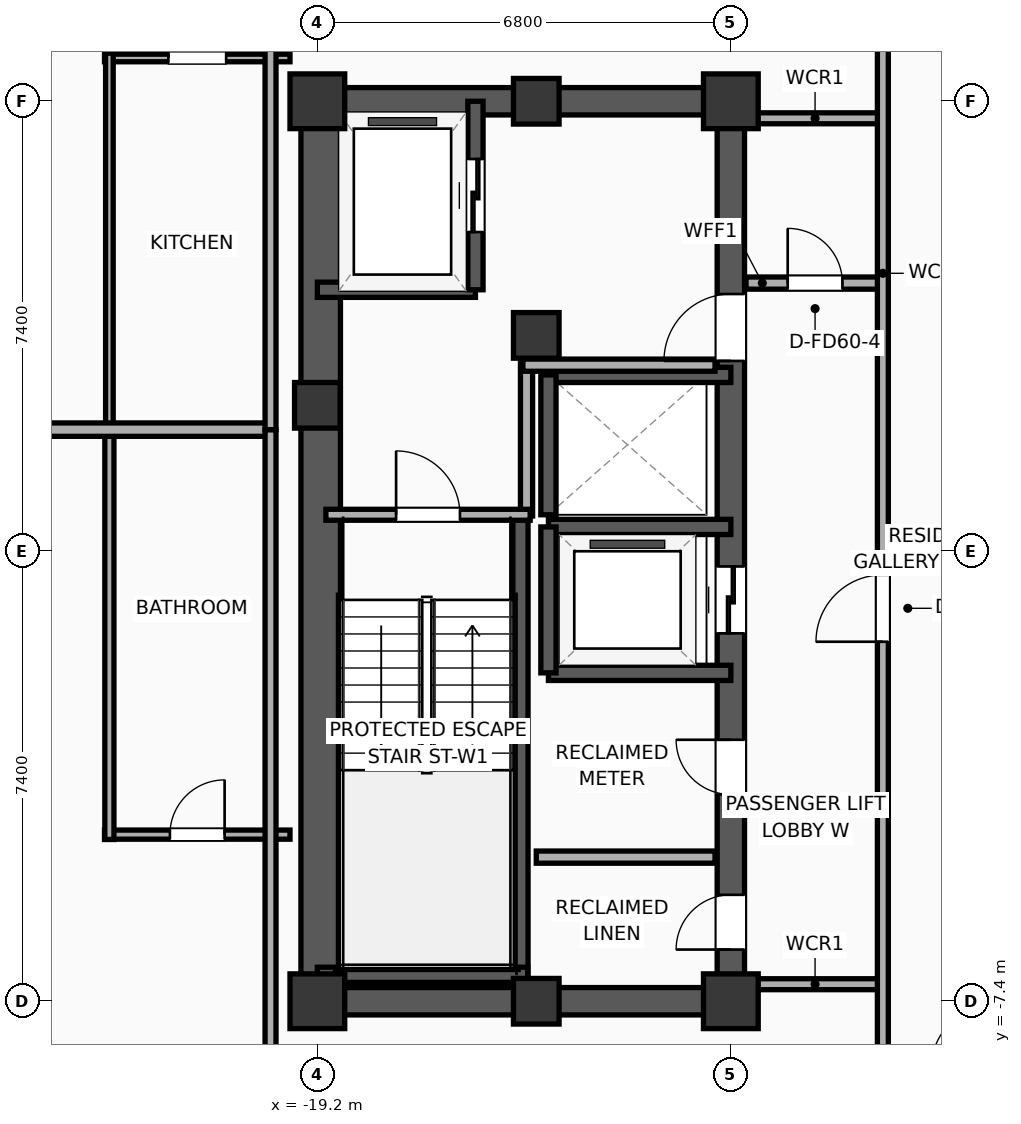
"""IFC4 building model, lengths in metres.
Left out: names, types, materials, properties, quantities, classifications, styles, units other than length and angle.
Written with IfcOpenShell. Run it as: python <this file> out.ifc"""

import sys

from ifc_helpers import new_model, si_unit, direction, frame, frame_2d, origin, origin_2d, place, context, subcontext, project, spatial, rectangle, extrude, element, fill, save


model = new_model("IFC4")
c1 = context("Model", 3, precision=1e-05, world=origin(), true_north=direction((0.0, 1.0)))
c2 = subcontext(c1, "Body", "Model", "MODEL_VIEW")
j1 = project(units=[si_unit("LENGTHUNIT", "METRE"), si_unit("PLANEANGLEUNIT", "RADIAN")], contexts=[c1])
p1 = place(None, origin())
s1 = spatial("IfcSite", under=j1, at=p1, CompositionType="ELEMENT")
p2 = place(p1, origin())
s2 = spatial("IfcBuilding", under=s1, at=p2, CompositionType="ELEMENT")
p3 = place(p2, frame((0.0, 0.0, 175.5)))
s3 = spatial("IfcBuildingStorey", under=s2, at=p3, CompositionType="ELEMENT", Elevation=175.5)
p4 = place(p3, frame((-19.2, -7.4, 0.0), z_axis=(0.0, 0.0, 1.0), x_axis=(1.0, 0.0, 0.0)))
e1 = element("IfcColumn", 1, at=p4, inside=s3, PredefinedType="COLUMN", context=c2, shape_type="SweptSolid", body=[
    extrude(rectangle(XDim=0.9, YDim=0.9, at=origin_2d()), origin(), (0.0, 0.0, 1.0), 3.9),
])
p5 = place(p3, frame((-19.2, 2.4, 0.0), z_axis=(0.0, 0.0, 1.0), x_axis=(1.0, 0.0, 0.0)))
e2 = element("IfcColumn", 2, at=p5, inside=s3, PredefinedType="COLUMN", context=c2, shape_type="SweptSolid", body=[
    extrude(rectangle(XDim=0.75, YDim=0.75, at=origin_2d()), origin(), (0.0, 0.0, 1.0), 3.9),
])
p6 = place(p3, frame((-19.2, 7.4, 0.0), z_axis=(0.0, 0.0, 1.0), x_axis=(1.0, 0.0, 0.0)))
e3 = element("IfcColumn", 3, at=p6, inside=s3, PredefinedType="COLUMN", context=c2, shape_type="SweptSolid", body=[
    extrude(rectangle(XDim=0.9, YDim=0.9, at=origin_2d()), origin(), (0.0, 0.0, 1.0), 3.9),
])
for number, where, z_axis, x_axis in (
    (4, (-15.6, -7.4, 0.0), (0.0, 0.0, 1.0), (1.0, 0.0, 0.0)),
    (5, (-15.6, 7.4, 0.0), (0.0, 0.0, 1.0), (1.0, 0.0, 0.0)),
):
    element("IfcColumn", number, at=place(p3, frame(where, z_axis=z_axis, x_axis=x_axis)), inside=s3, PredefinedType="COLUMN", context=c2, shape_type="SweptSolid", body=[
        extrude(rectangle(XDim=0.75, YDim=0.75, at=origin_2d()), origin(), (0.0, 0.0, 1.0), 3.9),
    ])
p7 = place(p3, frame((-12.4, -7.4, 0.0), z_axis=(0.0, 0.0, 1.0), x_axis=(1.0, 0.0, 0.0)))
e6 = element("IfcColumn", 6, at=p7, inside=s3, PredefinedType="COLUMN", context=c2, shape_type="SweptSolid", body=[
    extrude(rectangle(XDim=0.9, YDim=0.9, at=origin_2d()), origin(), (0.0, 0.0, 1.0), 3.9),
])
p8 = place(p3, frame((-15.6, 3.55, 0.0), z_axis=(0.0, 0.0, 1.0), x_axis=(1.0, 0.0, 0.0)))
e7 = element("IfcColumn", 7, at=p8, inside=s3, PredefinedType="COLUMN", context=c2, shape_type="SweptSolid", body=[
    extrude(rectangle(XDim=0.75, YDim=0.75, at=origin_2d()), origin(), (0.0, 0.0, 1.0), 3.9),
])
p9 = place(p3, frame((-12.4, 7.4, 0.0), z_axis=(0.0, 0.0, 1.0), x_axis=(1.0, 0.0, 0.0)))
e8 = element("IfcColumn", 8, at=p9, inside=s3, PredefinedType="COLUMN", context=c2, shape_type="SweptSolid", body=[
    extrude(rectangle(XDim=0.9, YDim=0.9, at=origin_2d()), origin(), (0.0, 0.0, 1.0), 3.9),
])
for number, where, z_axis, x_axis in (
    (9, (-19.425, -7.4, 0.0), (0.0, 0.0, 1.0), (1.0, 0.0, 0.0)),
    (10, (-19.425, 7.4, 0.0), (0.0, 0.0, 1.0), (1.0, 0.0, 0.0)),
):
    element("IfcWall", number, at=place(p3, frame(where, z_axis=z_axis, x_axis=x_axis)), inside=s3, PredefinedType="SHEAR", context=c2, shape_type="SweptSolid", body=[
        extrude(rectangle(XDim=7.25, YDim=0.45, at=frame_2d((3.625, 0.0))), origin(), (0.0, 0.0, 1.0), 3.65),
    ])
p10 = place(p3, frame((-19.145, -7.4, 0.0), z_axis=(0.0, 0.0, 1.0), x_axis=(0.0, 1.0, 0.0)))
e11 = element("IfcWall", 11, at=p10, inside=s3, PredefinedType="SHEAR", context=c2, shape_type="SweptSolid", body=[
    extrude(rectangle(XDim=14.8, YDim=0.65, at=frame_2d((7.4, 0.0))), origin(), (0.0, 0.0, 1.0), 3.65),
])
p11 = place(p3, frame((-12.4, -7.4, 0.0), z_axis=(0.0, 0.0, 1.0), x_axis=(0.0, 1.0, 0.0)))
e12 = element("IfcWall", 12, at=p11, inside=s3, PredefinedType="SHEAR", context=c2, shape_type="SweptSolid", body=[
    extrude(rectangle(XDim=14.8, YDim=0.45, at=frame_2d((7.4, 0.0))), origin(), (0.0, 0.0, 1.0), 3.65),
])
p12 = place(p11, frame((6.05, 0.0, 0.0)))
e13 = element("IfcOpeningElement", 13, at=p12, cuts=e12, PredefinedType="OPENING", context=c2, shape_type="SweptSolid", body=[
    extrude(rectangle(XDim=1.1, YDim=2.05, at=frame_2d((0.55, 1.025))), frame((0.0, 0.235, 0.0), z_axis=(0.0, -1.0, 0.0), x_axis=(1.0, 0.0, 0.0)), (0.0, 0.0, 1.0), 0.47),
])
p13 = place(p11, frame((10.53, 0.0, 0.0)))
e14 = element("IfcOpeningElement", 14, at=p13, cuts=e12, PredefinedType="OPENING", context=c2, shape_type="SweptSolid", body=[
    extrude(rectangle(XDim=1.1, YDim=2.05, at=frame_2d((0.55, 1.025))), frame((0.0, 0.235, 0.0), z_axis=(0.0, -1.0, 0.0), x_axis=(1.0, 0.0, 0.0)), (0.0, 0.0, 1.0), 0.47),
])
p14 = place(p11, frame((0.85, 0.0, 0.0)))
e15 = element("IfcOpeningElement", 15, at=p14, cuts=e12, PredefinedType="OPENING", context=c2, shape_type="SweptSolid", body=[
    extrude(rectangle(XDim=0.9, YDim=2.05, at=frame_2d((0.45, 1.025))), frame((0.0, 0.235, 0.0), z_axis=(0.0, -1.0, 0.0), x_axis=(1.0, 0.0, 0.0)), (0.0, 0.0, 1.0), 0.47),
])
p15 = place(p11, frame((3.4, 0.0, 0.0)))
e16 = element("IfcOpeningElement", 16, at=p15, cuts=e12, PredefinedType="OPENING", context=c2, shape_type="SweptSolid", body=[
    extrude(rectangle(XDim=0.9, YDim=2.05, at=frame_2d((0.45, 1.025))), frame((0.0, 0.235, 0.0), z_axis=(0.0, -1.0, 0.0), x_axis=(1.0, 0.0, 0.0)), (0.0, 0.0, 1.0), 0.47),
])
p16 = place(p3, frame((-15.86, -7.085, 0.0), z_axis=(0.0, 0.0, 1.0), x_axis=(0.0, 1.0, 0.0)))
e17 = element("IfcWall", 17, at=p16, inside=s3, PredefinedType="SOLIDWALL", context=c2, shape_type="SweptSolid", body=[
    extrude(rectangle(XDim=7.685, YDim=0.25, at=frame_2d((3.843, 0.0))), origin(), (0.0, 0.0, 1.0), 3.65),
])
p17 = place(p3, frame((-19.2, -6.965, 0.0), z_axis=(0.0, 0.0, 1.0), x_axis=(1.0, 0.0, 0.0)))
e18 = element("IfcWall", 18, at=p17, inside=s3, PredefinedType="SOLIDWALL", context=c2, shape_type="SweptSolid", body=[
    extrude(rectangle(XDim=3.46, YDim=0.25, at=frame_2d((1.73, 0.0))), origin(), (0.0, 0.0, 1.0), 3.65),
])
p18 = place(p3, frame((-19.2, 4.3, 0.0), z_axis=(0.0, 0.0, 1.0), x_axis=(1.0, 0.0, 0.0)))
e19 = element("IfcWall", 19, at=p18, inside=s3, PredefinedType="SOLIDWALL", context=c2, shape_type="SweptSolid", body=[
    extrude(rectangle(XDim=2.6, YDim=0.25, at=frame_2d((1.3, 0.0))), origin(), (0.0, 0.0, 1.0), 3.65),
])
p19 = place(p3, frame((-16.6, 4.3, 0.0), z_axis=(0.0, 0.0, 1.0), x_axis=(0.0, 1.0, 0.0)))
e20 = element("IfcWall", 20, at=p19, inside=s3, PredefinedType="SOLIDWALL", context=c2, shape_type="SweptSolid", body=[
    extrude(rectangle(XDim=3.1, YDim=0.25, at=frame_2d((1.55, 0.0))), origin(), (0.0, 0.0, 1.0), 3.65),
])
p20 = place(p19, frame((0.95, 0.0, 0.0)))
e21 = element("IfcOpeningElement", 21, at=p20, cuts=e20, PredefinedType="OPENING", context=c2, shape_type="SweptSolid", body=[
    extrude(rectangle(XDim=1.2, YDim=2.05, at=frame_2d((0.6, 1.025))), frame((0.0, 0.135, 0.0), z_axis=(0.0, -1.0, 0.0), x_axis=(1.0, 0.0, 0.0)), (0.0, 0.0, 1.0), 0.27),
])
for number, where, z_axis, x_axis in (
    (22, (-15.4, -2.0, 0.0), (0.0, 0.0, 1.0), (1.0, 0.0, 0.0)),
    (23, (-12.4, 0.4, 0.0), (0.0, 0.0, 1.0), (-1.0, 0.0, 0.0)),
):
    element("IfcWall", number, at=place(p3, frame(where, z_axis=z_axis, x_axis=x_axis)), inside=s3, PredefinedType="SOLIDWALL", context=c2, shape_type="SweptSolid", body=[
        extrude(rectangle(XDim=3.0, YDim=0.25, at=frame_2d((1.5, 0.0))), origin(), (0.0, 0.0, 1.0), 3.65),
    ])
p21 = place(p3, frame((-15.4, 0.4, 0.0), z_axis=(0.0, 0.0, 1.0), x_axis=(0.0, -1.0, 0.0)))
e24 = element("IfcWall", 24, at=p21, inside=s3, PredefinedType="SOLIDWALL", context=c2, shape_type="SweptSolid", body=[
    extrude(rectangle(XDim=2.4, YDim=0.25, at=frame_2d((1.2, 0.0))), origin(), (0.0, 0.0, 1.0), 3.65),
])
p22 = place(p3, frame((-12.4, 2.9, 0.0), z_axis=(0.0, 0.0, 1.0), x_axis=(-1.0, 0.0, 0.0)))
e25 = element("IfcWall", 25, at=p22, inside=s3, PredefinedType="SOLIDWALL", context=c2, shape_type="SweptSolid", body=[
    extrude(rectangle(XDim=3.0, YDim=0.25, at=frame_2d((1.5, 0.0))), origin(), (0.0, 0.0, 1.0), 3.65),
])
p23 = place(p3, frame((-15.4, 2.9, 0.0), z_axis=(0.0, 0.0, 1.0), x_axis=(0.0, -1.0, 0.0)))
e26 = element("IfcWall", 26, at=p23, inside=s3, PredefinedType="SOLIDWALL", context=c2, shape_type="SweptSolid", body=[
    extrude(rectangle(XDim=2.3, YDim=0.25, at=frame_2d((1.15, 0.0))), origin(), (0.0, 0.0, 1.0), 3.65),
])
p24 = place(p3, frame((-15.76, 0.58, 0.0), z_axis=(0.0, 0.0, 1.0), x_axis=(0.0, 1.0, 0.0)))
e27 = element("IfcWall", 27, at=p24, inside=s3, PredefinedType="PARTITIONING", context=c2, shape_type="SweptSolid", body=[
    extrude(rectangle(XDim=2.52, YDim=0.2, at=frame_2d((1.26, 0.0))), origin(), (0.0, 0.0, 1.0), 3.65),
])
p25 = place(p3, frame((-15.82, 3.06, 0.0), z_axis=(0.0, 0.0, 1.0), x_axis=(1.0, 0.0, 0.0)))
e28 = element("IfcWall", 28, at=p25, inside=s3, PredefinedType="PARTITIONING", context=c2, shape_type="SweptSolid", body=[
    extrude(rectangle(XDim=3.16, YDim=0.2, at=frame_2d((1.58, 0.0))), origin(), (0.0, 0.0, 1.0), 3.65),
])
p26 = place(p3, frame((-19.06, 0.6, 0.0), z_axis=(0.0, 0.0, 1.0), x_axis=(1.0, 0.0, 0.0)))
e29 = element("IfcWall", 29, at=p26, inside=s3, PredefinedType="PARTITIONING", context=c2, shape_type="SweptSolid", body=[
    extrude(rectangle(XDim=3.36, YDim=0.18, at=frame_2d((1.68, 0.0))), origin(), (0.0, 0.0, 1.0), 3.65),
])
p27 = place(p26, frame((1.155, 0.0, 0.0)))
e30 = element("IfcOpeningElement", 30, at=p27, cuts=e29, PredefinedType="OPENING", context=c2, shape_type="SweptSolid", body=[
    extrude(rectangle(XDim=1.05, YDim=2.05, at=frame_2d((0.525, 1.025))), frame((0.0, 0.1, 0.0), z_axis=(0.0, -1.0, 0.0), x_axis=(1.0, 0.0, 0.0)), (0.0, 0.0, 1.0), 0.2),
])
p28 = place(p3, frame((-15.6, -5.03, 0.0), z_axis=(0.0, 0.0, 1.0), x_axis=(1.0, 0.0, 0.0)))
e31 = element("IfcWall", 31, at=p28, inside=s3, PredefinedType="PARTITIONING", context=c2, shape_type="SweptSolid", body=[
    extrude(rectangle(XDim=2.94, YDim=0.2, at=frame_2d((1.47, 0.0))), origin(), (0.0, 0.0, 1.0), 3.65),
])
p29 = place(p3, frame((-12.15, 4.41, 0.0), z_axis=(0.0, 0.0, 1.0), x_axis=(1.0, 0.0, 0.0)))
e32 = element("IfcWall", 32, at=p29, inside=s3, PredefinedType="PARTITIONING", context=c2, shape_type="SweptSolid", body=[
    extrude(rectangle(XDim=2.27, YDim=0.2, at=frame_2d((1.135, 0.0))), origin(), (0.0, 0.0, 1.0), 3.65),
])
p30 = place(p29, frame((0.685, 0.0, 0.0)))
e33 = element("IfcOpeningElement", 33, at=p30, cuts=e32, PredefinedType="OPENING", context=c2, shape_type="SweptSolid", body=[
    extrude(rectangle(XDim=0.9, YDim=2.05, at=frame_2d((0.45, 1.025))), frame((0.0, 0.11, 0.0), z_axis=(0.0, -1.0, 0.0), x_axis=(1.0, 0.0, 0.0)), (0.0, 0.0, 1.0), 0.22),
])
for number, where, z_axis, x_axis in (
    (34, (-12.15, 7.12, 0.0), (0.0, 0.0, 1.0), (1.0, 0.0, 0.0)),
    (35, (-12.15, -7.12, 0.0), (0.0, 0.0, 1.0), (1.0, 0.0, 0.0)),
):
    element("IfcWall", number, at=place(p3, frame(where, z_axis=z_axis, x_axis=x_axis)), inside=s3, PredefinedType="PARTITIONING", context=c2, shape_type="SweptSolid", body=[
        extrude(rectangle(XDim=2.27, YDim=0.18, at=frame_2d((1.135, 0.0))), origin(), (0.0, 0.0, 1.0), 3.65),
    ])
p31 = place(p3, frame((-9.9, -9.38, 0.0), z_axis=(0.0, 0.0, 1.0), x_axis=(0.0, 1.0, 0.0)))
e36 = element("IfcWall", 36, at=p31, inside=s3, PredefinedType="PARTITIONING", context=c2, shape_type="SweptSolid", body=[
    extrude(rectangle(XDim=18.76, YDim=0.18, at=frame_2d((9.38, 0.0))), origin(), (0.0, 0.0, 1.0), 3.65),
])
p32 = place(p31, frame((7.892, 0.0, 0.0)))
e37 = element("IfcOpeningElement", 37, at=p32, cuts=e36, PredefinedType="OPENING", context=c2, shape_type="SweptSolid", body=[
    extrude(rectangle(XDim=1.1, YDim=2.05, at=frame_2d((0.55, 1.025))), frame((0.0, 0.1, 0.0), z_axis=(0.0, -1.0, 0.0), x_axis=(1.0, 0.0, 0.0)), (0.0, 0.0, 1.0), 0.2),
])
p33 = place(p3, frame((-22.7, -4.66, 0.0), z_axis=(0.0, 0.0, 1.0), x_axis=(1.0, 0.0, 0.0)))
e38 = element("IfcWall", 38, at=p33, inside=s3, PredefinedType="PLUMBINGWALL", context=c2, shape_type="SweptSolid", body=[
    extrude(rectangle(XDim=3.05, YDim=0.15, at=frame_2d((1.525, 0.0))), origin(), (0.0, 0.0, 1.0), 3.65),
])
p34 = place(p33, frame((1.075, 0.0, 0.0)))
e39 = element("IfcOpeningElement", 39, at=p34, cuts=e38, PredefinedType="OPENING", context=c2, shape_type="SweptSolid", body=[
    extrude(rectangle(XDim=0.9, YDim=2.05, at=frame_2d((0.45, 1.025))), frame((0.0, 0.085, 0.0), z_axis=(0.0, -1.0, 0.0), x_axis=(1.0, 0.0, 0.0)), (0.0, 0.0, 1.0), 0.17),
])
p35 = place(p3, frame((-22.62, -4.74, 0.0), z_axis=(0.0, 0.0, 1.0), x_axis=(0.0, 1.0, 0.0)))
e40 = element("IfcWall", 40, at=p35, inside=s3, PredefinedType="PLUMBINGWALL", context=c2, shape_type="SweptSolid", body=[
    extrude(rectangle(XDim=6.72, YDim=0.15, at=frame_2d((3.36, 0.0))), origin(), (0.0, 0.0, 1.0), 3.65),
])
p36 = place(p3, frame((-22.7, 8.112, 0.0), z_axis=(0.0, 0.0, 1.0), x_axis=(1.0, 0.0, 0.0)))
e41 = element("IfcWall", 41, at=p36, inside=s3, PredefinedType="PARTITIONING", context=c2, shape_type="SweptSolid", body=[
    extrude(rectangle(XDim=3.05, YDim=0.125, at=frame_2d((1.525, 0.0))), origin(), (0.0, 0.0, 1.0), 3.65),
])
p37 = place(p36, frame((1.05, 0.0, 0.0)))
e42 = element("IfcOpeningElement", 42, at=p37, cuts=e41, PredefinedType="OPENING", context=c2, shape_type="SweptSolid", body=[
    extrude(rectangle(XDim=0.95, YDim=2.05, at=frame_2d((0.475, 1.025))), frame((0.0, 0.073, 0.0), z_axis=(0.0, -1.0, 0.0), x_axis=(1.0, 0.0, 0.0)), (0.0, 0.0, 1.0), 0.145),
])
p38 = place(p3, frame((-22.62, 2.02, 0.0), z_axis=(0.0, 0.0, 1.0), x_axis=(0.0, 1.0, 0.0)))
e43 = element("IfcWall", 43, at=p38, inside=s3, PredefinedType="PARTITIONING", context=c2, shape_type="SweptSolid", body=[
    extrude(rectangle(XDim=6.172, YDim=0.125, at=frame_2d((3.086, 0.0))), origin(), (0.0, 0.0, 1.0), 3.65),
])
p39 = place(p3, frame((-19.97, 2.0, 0.0), z_axis=(0.0, 0.0, 1.0), x_axis=(-1.0, 0.0, 0.0)))
e44 = element("IfcWall", 44, at=p39, inside=s3, PredefinedType="PARTITIONING", context=c2, shape_type="SweptSolid", body=[
    extrude(rectangle(XDim=13.297, YDim=0.22, at=frame_2d((6.648, 0.0))), origin(), (0.0, 0.0, 1.0), 3.65),
])
p40 = place(p3, frame((-19.97, -22.704, 0.0), z_axis=(0.0, 0.0, 1.0), x_axis=(0.0, 1.0, 0.0)))
e45 = element("IfcWall", 45, at=p40, inside=s3, PredefinedType="PARTITIONING", context=c2, shape_type="SweptSolid", body=[
    extrude(rectangle(XDim=24.704, YDim=0.18, at=frame_2d((12.352, 0.0))), origin(), (0.0, 0.0, 1.0), 3.65),
])
p41 = place(p40, frame((12.223, 0.0, 0.0)))
e46 = element("IfcOpeningElement", 46, at=p41, cuts=e45, PredefinedType="OPENING", context=c2, shape_type="SweptSolid", body=[
    extrude(rectangle(XDim=0.9, YDim=2.05, at=frame_2d((0.45, 1.025))), frame((0.0, 0.1, 0.0), z_axis=(0.0, -1.0, 0.0), x_axis=(1.0, 0.0, 0.0)), (0.0, 0.0, 1.0), 0.2),
])
p42 = place(p3, frame((-19.97, 2.0, 0.0), z_axis=(0.0, 0.0, 1.0), x_axis=(0.0, 1.0, 0.0)))
e47 = element("IfcWall", 47, at=p42, inside=s3, PredefinedType="PARTITIONING", context=c2, shape_type="SweptSolid", body=[
    extrude(rectangle(XDim=15.979, YDim=0.18, at=frame_2d((7.989, 0.0))), origin(), (0.0, 0.0, 1.0), 3.04),
])
p43 = place(p42, frame((7.579, 0.0, 0.0)))
e48 = element("IfcOpeningElement", 48, at=p43, cuts=e47, PredefinedType="OPENING", context=c2, shape_type="SweptSolid", body=[
    extrude(rectangle(XDim=0.9, YDim=2.05, at=frame_2d((0.45, 1.025))), frame((0.0, 0.1, 0.0), z_axis=(0.0, -1.0, 0.0), x_axis=(1.0, 0.0, 0.0)), (0.0, 0.0, 1.0), 0.2),
])
p44 = place(p20, origin())
e49 = element("IfcDoor", 49, at=p44, inside=s3, OperationType="SLIDING_TO_LEFT", PredefinedType="DOOR", context=c2, shape_type="SweptSolid", body=[
    extrude(rectangle(XDim=1.2, YDim=2.05, at=frame_2d((0.6, 1.025))), frame((0.0, 0.025, 0.0), z_axis=(0.0, -1.0, 0.0), x_axis=(1.0, 0.0, 0.0)), (0.0, 0.0, 1.0), 0.05),
])
fill(e21, e49)
p45 = place(p12, origin())
e50 = element("IfcDoor", 50, at=p45, inside=s3, OperationType="SLIDING_TO_LEFT", PredefinedType="DOOR", context=c2, shape_type="SweptSolid", body=[
    extrude(rectangle(XDim=1.1, YDim=2.05, at=frame_2d((0.55, 1.025))), frame((0.0, 0.025, 0.0), z_axis=(0.0, -1.0, 0.0), x_axis=(1.0, 0.0, 0.0)), (0.0, 0.0, 1.0), 0.05),
])
fill(e13, e50)
p46 = place(p27, origin())
e51 = element("IfcDoor", 51, at=p46, inside=s3, OperationType="SINGLE_SWING_LEFT", PredefinedType="DOOR", context=c2, shape_type="SweptSolid", body=[
    extrude(rectangle(XDim=1.05, YDim=2.05, at=frame_2d((0.525, 1.025))), frame((0.0, 0.025, 0.0), z_axis=(0.0, -1.0, 0.0), x_axis=(1.0, 0.0, 0.0)), (0.0, 0.0, 1.0), 0.05),
])
fill(e30, e51)
p47 = place(p30, origin())
e52 = element("IfcDoor", 52, at=p47, inside=s3, OperationType="SINGLE_SWING_LEFT", PredefinedType="DOOR", context=c2, shape_type="SweptSolid", body=[
    extrude(rectangle(XDim=0.9, YDim=2.05, at=frame_2d((0.45, 1.025))), frame((0.0, 0.025, 0.0), z_axis=(0.0, -1.0, 0.0), x_axis=(1.0, 0.0, 0.0)), (0.0, 0.0, 1.0), 0.05),
])
fill(e33, e52)
p48 = place(p32, origin())
e53 = element("IfcDoor", 53, at=p48, inside=s3, OperationType="SINGLE_SWING_LEFT", PredefinedType="DOOR", context=c2, shape_type="SweptSolid", body=[
    extrude(rectangle(XDim=1.1, YDim=2.05, at=frame_2d((0.55, 1.025))), frame((0.0, 0.025, 0.0), z_axis=(0.0, -1.0, 0.0), x_axis=(1.0, 0.0, 0.0)), (0.0, 0.0, 1.0), 0.05),
])
fill(e37, e53)
p49 = place(p34, origin())
e54 = element("IfcDoor", 54, at=p49, inside=s3, OperationType="SINGLE_SWING_RIGHT", PredefinedType="DOOR", context=c2, shape_type="SweptSolid", body=[
    extrude(rectangle(XDim=0.9, YDim=2.05, at=frame_2d((0.45, 1.025))), frame((0.0, 0.025, 0.0), z_axis=(0.0, -1.0, 0.0), x_axis=(1.0, 0.0, 0.0)), (0.0, 0.0, 1.0), 0.05),
])
fill(e39, e54)
p50 = place(p37, origin())
e55 = element("IfcDoor", 55, at=p50, inside=s3, OperationType="SINGLE_SWING_LEFT", PredefinedType="DOOR", context=c2, shape_type="SweptSolid", body=[
    extrude(rectangle(XDim=0.95, YDim=2.05, at=frame_2d((0.475, 1.025))), frame((0.0, 0.025, 0.0), z_axis=(0.0, -1.0, 0.0), x_axis=(1.0, 0.0, 0.0)), (0.0, 0.0, 1.0), 0.05),
])
fill(e42, e55)
p51 = place(p13, origin())
e56 = element("IfcDoor", 56, at=p51, inside=s3, OperationType="SINGLE_SWING_LEFT", PredefinedType="DOOR", context=c2, shape_type="SweptSolid", body=[
    extrude(rectangle(XDim=1.1, YDim=2.05, at=frame_2d((0.55, 1.025))), frame((0.0, 0.025, 0.0), z_axis=(0.0, -1.0, 0.0), x_axis=(1.0, 0.0, 0.0)), (0.0, 0.0, 1.0), 0.05),
])
fill(e14, e56)
p52 = place(p14, origin())
e57 = element("IfcDoor", 57, at=p52, inside=s3, OperationType="SINGLE_SWING_LEFT", PredefinedType="DOOR", context=c2, shape_type="SweptSolid", body=[
    extrude(rectangle(XDim=0.9, YDim=2.05, at=frame_2d((0.45, 1.025))), frame((0.0, 0.025, 0.0), z_axis=(0.0, -1.0, 0.0), x_axis=(1.0, 0.0, 0.0)), (0.0, 0.0, 1.0), 0.05),
])
fill(e15, e57)
p53 = place(p15, origin())
e58 = element("IfcDoor", 58, at=p53, inside=s3, OperationType="SINGLE_SWING_RIGHT", PredefinedType="DOOR", context=c2, shape_type="SweptSolid", body=[
    extrude(rectangle(XDim=0.9, YDim=2.05, at=frame_2d((0.45, 1.025))), frame((0.0, 0.025, 0.0), z_axis=(0.0, -1.0, 0.0), x_axis=(1.0, 0.0, 0.0)), (0.0, 0.0, 1.0), 0.05),
])
fill(e16, e58)
save(model, sys.argv[1])
